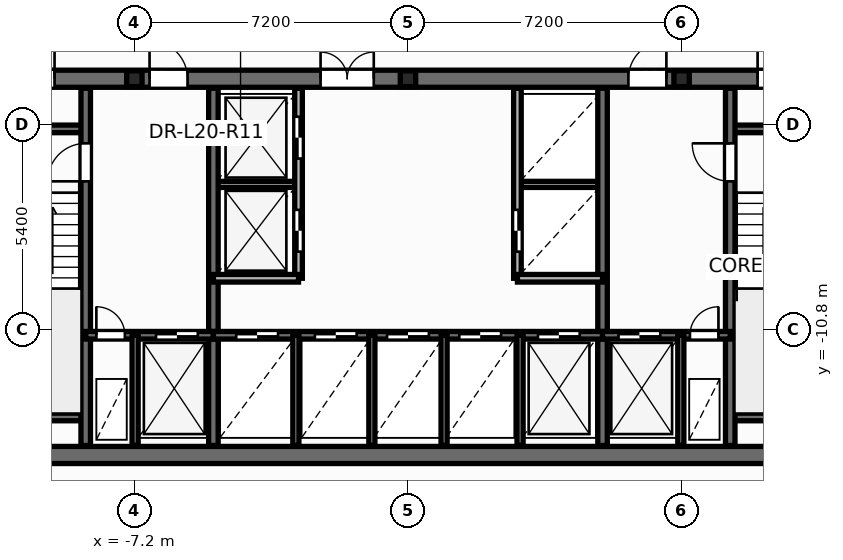
"""IFC4 building model, lengths in metres.
Left out: names, types, materials, properties, quantities, classifications, styles, units other than length and angle.
Written with IfcOpenShell. Run it as: python <this file> out.ifc"""

import sys

from ifc_helpers import new_model, si_unit, direction, frame, frame_2d, origin, origin_2d, place, context, subcontext, project, spatial, rectangle, i_section, extrude, element, fill, save


model = new_model("IFC4")
c1 = context("Model", 3, precision=1e-05, world=origin(), true_north=direction((0.0, 1.0)))
c2 = subcontext(c1, "Body", "Model", "MODEL_VIEW")
j1 = project(units=[si_unit("LENGTHUNIT", "METRE"), si_unit("PLANEANGLEUNIT", "RADIAN")], contexts=[c1])
p1 = place(None, origin())
s1 = spatial("IfcSite", under=j1, at=p1, CompositionType="ELEMENT")
p2 = place(p1, origin())
s2 = spatial("IfcBuilding", under=s1, at=p2, CompositionType="ELEMENT")
p3 = place(p2, frame((0.0, 0.0, 79.2)))
s3 = spatial("IfcBuildingStorey", under=s2, at=p3, CompositionType="ELEMENT", Elevation=79.2)
for number, where, z_axis, x_axis in (
    (1, (-7.2, -4.2, 0.0), (0.0, 0.0, 1.0), (1.0, 0.0, 0.0)),
    (2, (0.0, -4.2, 0.0), (0.0, 0.0, 1.0), (1.0, 0.0, 0.0)),
    (3, (7.2, -4.2, 0.0), (0.0, 0.0, 1.0), (1.0, 0.0, 0.0)),
):
    element("IfcColumn", number, at=place(p3, frame(where, z_axis=z_axis, x_axis=x_axis)), inside=s3, PredefinedType="PILASTER", context=c2, shape_type="SweptSolid", body=[
        extrude(i_section(OverallWidth=0.405, OverallDepth=0.414, WebThickness=0.022, FlangeThickness=0.032, at=origin_2d()), origin(), (0.0, 0.0, 1.0), 3.6),
    ])
for number, where, z_axis, x_axis in (
    (4, (-5.12, -6.98, 0.0), (0.0, 0.0, 1.0), (1.0, 0.0, 0.0)),
    (5, (2.88, -6.98, 0.0), (0.0, 0.0, 1.0), (1.0, 0.0, 0.0)),
):
    element("IfcWall", number, at=place(p3, frame(where, z_axis=z_axis, x_axis=x_axis)), inside=s3, PredefinedType="PARTITIONING", context=c2, shape_type="SweptSolid", body=[
        extrude(rectangle(XDim=2.24, YDim=0.16, at=frame_2d((1.12, 0.0))), origin(), (0.0, 0.0, 1.0), 3.35),
    ])
p4 = place(p3, frame((-12.65, -14.1, 0.0), z_axis=(0.0, 0.0, 1.0), x_axis=(1.0, 0.0, 0.0)))
e6 = element("IfcWall", 6, at=p4, inside=s3, PredefinedType="SHEAR", context=c2, shape_type="SweptSolid", body=[
    extrude(rectangle(XDim=25.3, YDim=0.45, at=frame_2d((12.65, 0.0))), origin(), (0.0, 0.0, 1.0), 3.6),
])
p5 = place(p3, frame((-12.65, -4.2, 0.0), z_axis=(0.0, 0.0, 1.0), x_axis=(1.0, 0.0, 0.0)))
e7 = element("IfcWall", 7, at=p5, inside=s3, PredefinedType="SHEAR", context=c2, shape_type="SweptSolid", body=[
    extrude(rectangle(XDim=25.3, YDim=0.45, at=frame_2d((12.65, 0.0))), origin(), (0.0, 0.0, 1.0), 3.6),
])
p6 = place(p5, frame((0.95, 0.0, 0.0)))
e8 = element("IfcOpeningElement", 8, at=p6, cuts=e7, PredefinedType="OPENING", context=c2, shape_type="SweptSolid", body=[
    extrude(rectangle(XDim=0.756, YDim=2.054, at=frame_2d((0.375, 1.027))), frame((0.0, 0.235, 0.0), z_axis=(0.0, -1.0, 0.0), x_axis=(1.0, 0.0, 0.0)), (0.0, 0.0, 1.0), 0.47),
])
p7 = place(p5, frame((2.6, 0.0, 0.0)))
e9 = element("IfcOpeningElement", 9, at=p7, cuts=e7, PredefinedType="OPENING", context=c2, shape_type="SweptSolid", body=[
    extrude(rectangle(XDim=0.756, YDim=2.054, at=frame_2d((0.375, 1.027))), frame((0.0, 0.235, 0.0), z_axis=(0.0, -1.0, 0.0), x_axis=(1.0, 0.0, 0.0)), (0.0, 0.0, 1.0), 0.47),
])
p8 = place(p5, frame((21.85, 0.0, 0.0)))
e10 = element("IfcOpeningElement", 10, at=p8, cuts=e7, PredefinedType="OPENING", context=c2, shape_type="SweptSolid", body=[
    extrude(rectangle(XDim=0.756, YDim=2.054, at=frame_2d((0.375, 1.027))), frame((0.0, 0.235, 0.0), z_axis=(0.0, -1.0, 0.0), x_axis=(1.0, 0.0, 0.0)), (0.0, 0.0, 1.0), 0.47),
])
p9 = place(p5, frame((23.5, 0.0, 0.0)))
e11 = element("IfcOpeningElement", 11, at=p9, cuts=e7, PredefinedType="OPENING", context=c2, shape_type="SweptSolid", body=[
    extrude(rectangle(XDim=0.756, YDim=2.054, at=frame_2d((0.375, 1.027))), frame((0.0, 0.235, 0.0), z_axis=(0.0, -1.0, 0.0), x_axis=(1.0, 0.0, 0.0)), (0.0, 0.0, 1.0), 0.47),
])
p10 = place(p5, frame((5.85, 0.0, 0.0)))
e12 = element("IfcOpeningElement", 12, at=p10, cuts=e7, PredefinedType="OPENING", context=c2, shape_type="SweptSolid", body=[
    extrude(rectangle(XDim=1.006, YDim=2.104, at=frame_2d((0.5, 1.052))), frame((0.0, 0.235, 0.0), z_axis=(0.0, -1.0, 0.0), x_axis=(1.0, 0.0, 0.0)), (0.0, 0.0, 1.0), 0.47),
])
p11 = place(p5, frame((10.35, 0.0, 0.0)))
e13 = element("IfcOpeningElement", 13, at=p11, cuts=e7, PredefinedType="OPENING", context=c2, shape_type="SweptSolid", body=[
    extrude(rectangle(XDim=1.406, YDim=2.154, at=frame_2d((0.7, 1.077))), frame((0.0, 0.235, 0.0), z_axis=(0.0, -1.0, 0.0), x_axis=(1.0, 0.0, 0.0)), (0.0, 0.0, 1.0), 0.47),
])
p12 = place(p5, frame((18.45, 0.0, 0.0)))
e14 = element("IfcOpeningElement", 14, at=p12, cuts=e7, PredefinedType="OPENING", context=c2, shape_type="SweptSolid", body=[
    extrude(rectangle(XDim=1.006, YDim=2.104, at=frame_2d((0.5, 1.052))), frame((0.0, 0.235, 0.0), z_axis=(0.0, -1.0, 0.0), x_axis=(1.0, 0.0, 0.0)), (0.0, 0.0, 1.0), 0.47),
])
for number, where, z_axis, x_axis in (
    (15, (-12.35, -5.52, 0.0), (0.0, 0.0, 1.0), (1.0, 0.0, 0.0)),
    (16, (-12.35, -13.1, 0.0), (0.0, 0.0, 1.0), (1.0, 0.0, 0.0)),
    (17, (8.48, -5.52, 0.0), (0.0, 0.0, 1.0), (1.0, 0.0, 0.0)),
    (18, (8.48, -13.1, 0.0), (0.0, 0.0, 1.0), (1.0, 0.0, 0.0)),
):
    element("IfcWall", number, at=place(p3, frame(where, z_axis=z_axis, x_axis=x_axis)), inside=s3, PredefinedType="SOLIDWALL", context=c2, shape_type="SweptSolid", body=[
        extrude(rectangle(XDim=3.87, YDim=0.2, at=frame_2d((1.935, 0.0))), origin(), (0.0, 0.0, 1.0), 3.6),
    ])
p13 = place(p3, frame((-8.48, -13.85, 0.0), z_axis=(0.0, 0.0, 1.0), x_axis=(0.0, 1.0, 0.0)))
e19 = element("IfcWall", 19, at=p13, inside=s3, PredefinedType="SHEAR", context=c2, shape_type="SweptSolid", body=[
    extrude(rectangle(XDim=9.4, YDim=0.25, at=frame_2d((4.7, 0.0))), origin(), (0.0, 0.0, 1.0), 3.6),
])
p14 = place(p13, frame((6.95, 0.0, 0.0)))
e20 = element("IfcOpeningElement", 20, at=p14, cuts=e19, PredefinedType="OPENING", context=c2, shape_type="SweptSolid", body=[
    extrude(rectangle(XDim=1.006, YDim=2.104, at=frame_2d((0.5, 1.052))), frame((0.0, 0.135, 0.0), z_axis=(0.0, -1.0, 0.0), x_axis=(1.0, 0.0, 0.0)), (0.0, 0.0, 1.0), 0.27),
])
p15 = place(p3, frame((8.48, -13.85, 0.0), z_axis=(0.0, 0.0, 1.0), x_axis=(0.0, 1.0, 0.0)))
e21 = element("IfcWall", 21, at=p15, inside=s3, PredefinedType="SHEAR", context=c2, shape_type="SweptSolid", body=[
    extrude(rectangle(XDim=9.4, YDim=0.25, at=frame_2d((4.7, 0.0))), origin(), (0.0, 0.0, 1.0), 3.6),
])
p16 = place(p15, frame((6.95, 0.0, 0.0)))
e22 = element("IfcOpeningElement", 22, at=p16, cuts=e21, PredefinedType="OPENING", context=c2, shape_type="SweptSolid", body=[
    extrude(rectangle(XDim=1.006, YDim=2.104, at=frame_2d((0.5, 1.052))), frame((0.0, 0.135, 0.0), z_axis=(0.0, -1.0, 0.0), x_axis=(1.0, 0.0, 0.0)), (0.0, 0.0, 1.0), 0.27),
])
for number, where, z_axis, x_axis in (
    (23, (-5.12, -13.85, 0.0), (0.0, 0.0, 1.0), (0.0, 1.0, 0.0)),
    (24, (5.12, -13.85, 0.0), (0.0, 0.0, 1.0), (0.0, 1.0, 0.0)),
):
    element("IfcWall", number, at=place(p3, frame(where, z_axis=z_axis, x_axis=x_axis)), inside=s3, PredefinedType="SHEAR", context=c2, shape_type="SweptSolid", body=[
        extrude(rectangle(XDim=9.4, YDim=0.25, at=frame_2d((4.7, 0.0))), origin(), (0.0, 0.0, 1.0), 3.6),
    ])
p17 = place(p3, frame((-8.48, -10.95, 0.0), z_axis=(0.0, 0.0, 1.0), x_axis=(1.0, 0.0, 0.0)))
e25 = element("IfcWall", 25, at=p17, inside=s3, PredefinedType="SOLIDWALL", context=c2, shape_type="SweptSolid", body=[
    extrude(rectangle(XDim=3.36, YDim=0.2, at=frame_2d((1.68, 0.0))), origin(), (0.0, 0.0, 1.0), 3.6),
])
p18 = place(p17, frame((0.28, 0.0, 0.0)))
e26 = element("IfcOpeningElement", 26, at=p18, cuts=e25, PredefinedType="OPENING", context=c2, shape_type="SweptSolid", body=[
    extrude(rectangle(XDim=0.756, YDim=2.054, at=frame_2d((0.375, 1.027))), frame((0.0, 0.11, 0.0), z_axis=(0.0, -1.0, 0.0), x_axis=(1.0, 0.0, 0.0)), (0.0, 0.0, 1.0), 0.22),
])
p19 = place(p17, frame((1.85, 0.0, 0.0)))
e27 = element("IfcOpeningElement", 27, at=p19, cuts=e25, PredefinedType="OPENING", context=c2, shape_type="SweptSolid", body=[
    extrude(rectangle(XDim=1.106, YDim=2.104, at=frame_2d((0.55, 1.052))), frame((0.0, 0.11, 0.0), z_axis=(0.0, -1.0, 0.0), x_axis=(1.0, 0.0, 0.0)), (0.0, 0.0, 1.0), 0.22),
])
p20 = place(p3, frame((-5.12, -10.95, 0.0), z_axis=(0.0, 0.0, 1.0), x_axis=(1.0, 0.0, 0.0)))
e28 = element("IfcWall", 28, at=p20, inside=s3, PredefinedType="SOLIDWALL", context=c2, shape_type="SweptSolid", body=[
    extrude(rectangle(XDim=10.24, YDim=0.2, at=frame_2d((5.12, 0.0))), origin(), (0.0, 0.0, 1.0), 3.6),
])
p21 = place(p20, frame((0.6, 0.0, 0.0)))
e29 = element("IfcOpeningElement", 29, at=p21, cuts=e28, PredefinedType="OPENING", context=c2, shape_type="SweptSolid", body=[
    extrude(rectangle(XDim=1.106, YDim=2.104, at=frame_2d((0.55, 1.052))), frame((0.0, 0.11, 0.0), z_axis=(0.0, -1.0, 0.0), x_axis=(1.0, 0.0, 0.0)), (0.0, 0.0, 1.0), 0.22),
])
p22 = place(p20, frame((2.67, 0.0, 0.0)))
e30 = element("IfcOpeningElement", 30, at=p22, cuts=e28, PredefinedType="OPENING", context=c2, shape_type="SweptSolid", body=[
    extrude(rectangle(XDim=1.106, YDim=2.104, at=frame_2d((0.55, 1.052))), frame((0.0, 0.11, 0.0), z_axis=(0.0, -1.0, 0.0), x_axis=(1.0, 0.0, 0.0)), (0.0, 0.0, 1.0), 0.22),
])
p23 = place(p20, frame((4.57, 0.0, 0.0)))
e31 = element("IfcOpeningElement", 31, at=p23, cuts=e28, PredefinedType="OPENING", context=c2, shape_type="SweptSolid", body=[
    extrude(rectangle(XDim=1.106, YDim=2.104, at=frame_2d((0.55, 1.052))), frame((0.0, 0.11, 0.0), z_axis=(0.0, -1.0, 0.0), x_axis=(1.0, 0.0, 0.0)), (0.0, 0.0, 1.0), 0.22),
])
p24 = place(p20, frame((6.47, 0.0, 0.0)))
e32 = element("IfcOpeningElement", 32, at=p24, cuts=e28, PredefinedType="OPENING", context=c2, shape_type="SweptSolid", body=[
    extrude(rectangle(XDim=1.106, YDim=2.104, at=frame_2d((0.55, 1.052))), frame((0.0, 0.11, 0.0), z_axis=(0.0, -1.0, 0.0), x_axis=(1.0, 0.0, 0.0)), (0.0, 0.0, 1.0), 0.22),
])
p25 = place(p20, frame((8.54, 0.0, 0.0)))
e33 = element("IfcOpeningElement", 33, at=p25, cuts=e28, PredefinedType="OPENING", context=c2, shape_type="SweptSolid", body=[
    extrude(rectangle(XDim=1.106, YDim=2.104, at=frame_2d((0.55, 1.052))), frame((0.0, 0.11, 0.0), z_axis=(0.0, -1.0, 0.0), x_axis=(1.0, 0.0, 0.0)), (0.0, 0.0, 1.0), 0.22),
])
p26 = place(p3, frame((5.12, -10.95, 0.0), z_axis=(0.0, 0.0, 1.0), x_axis=(1.0, 0.0, 0.0)))
e34 = element("IfcWall", 34, at=p26, inside=s3, PredefinedType="SOLIDWALL", context=c2, shape_type="SweptSolid", body=[
    extrude(rectangle(XDim=3.36, YDim=0.2, at=frame_2d((1.68, 0.0))), origin(), (0.0, 0.0, 1.0), 3.6),
])
p27 = place(p26, frame((0.42, 0.0, 0.0)))
e35 = element("IfcOpeningElement", 35, at=p27, cuts=e34, PredefinedType="OPENING", context=c2, shape_type="SweptSolid", body=[
    extrude(rectangle(XDim=1.106, YDim=2.104, at=frame_2d((0.55, 1.052))), frame((0.0, 0.11, 0.0), z_axis=(0.0, -1.0, 0.0), x_axis=(1.0, 0.0, 0.0)), (0.0, 0.0, 1.0), 0.22),
])
p28 = place(p26, frame((2.3, 0.0, 0.0)))
e36 = element("IfcOpeningElement", 36, at=p28, cuts=e34, PredefinedType="OPENING", context=c2, shape_type="SweptSolid", body=[
    extrude(rectangle(XDim=0.756, YDim=2.054, at=frame_2d((0.375, 1.027))), frame((0.0, 0.11, 0.0), z_axis=(0.0, -1.0, 0.0), x_axis=(1.0, 0.0, 0.0)), (0.0, 0.0, 1.0), 0.22),
])
for number, where, z_axis, x_axis in (
    (37, (-7.18, -13.85, 0.0), (0.0, 0.0, 1.0), (0.0, 1.0, 0.0)),
    (38, (7.18, -13.85, 0.0), (0.0, 0.0, 1.0), (0.0, 1.0, 0.0)),
    (39, (-2.95, -13.85, 0.0), (0.0, 0.0, 1.0), (0.0, 1.0, 0.0)),
    (40, (2.95, -13.85, 0.0), (0.0, 0.0, 1.0), (0.0, 1.0, 0.0)),
):
    element("IfcWall", number, at=place(p3, frame(where, z_axis=z_axis, x_axis=x_axis)), inside=s3, PredefinedType="PARTITIONING", context=c2, shape_type="SweptSolid", body=[
        extrude(rectangle(XDim=2.9, YDim=0.16, at=frame_2d((1.45, 0.0))), origin(), (0.0, 0.0, 1.0), 2.375),
    ])
p29 = place(p3, frame((-2.88, -9.45, 0.0), z_axis=(0.0, 0.0, 1.0), x_axis=(0.0, 1.0, 0.0)))
e41 = element("IfcWall", 41, at=p29, inside=s3, PredefinedType="SOLIDWALL", context=c2, shape_type="SweptSolid", body=[
    extrude(rectangle(XDim=5.0, YDim=0.2, at=frame_2d((2.5, 0.0))), origin(), (0.0, 0.0, 1.0), 3.35),
])
p30 = place(p29, frame((0.7, 0.0, 0.0)))
e42 = element("IfcOpeningElement", 42, at=p30, cuts=e41, PredefinedType="OPENING", context=c2, shape_type="SweptSolid", body=[
    extrude(rectangle(XDim=1.106, YDim=2.104, at=frame_2d((0.55, 1.052))), frame((0.0, 0.11, 0.0), z_axis=(0.0, -1.0, 0.0), x_axis=(1.0, 0.0, 0.0)), (0.0, 0.0, 1.0), 0.22),
])
p31 = place(p29, frame((3.15, 0.0, 0.0)))
e43 = element("IfcOpeningElement", 43, at=p31, cuts=e41, PredefinedType="OPENING", context=c2, shape_type="SweptSolid", body=[
    extrude(rectangle(XDim=1.106, YDim=2.104, at=frame_2d((0.55, 1.052))), frame((0.0, 0.11, 0.0), z_axis=(0.0, -1.0, 0.0), x_axis=(1.0, 0.0, 0.0)), (0.0, 0.0, 1.0), 0.22),
])
p32 = place(p3, frame((-5.12, -9.45, 0.0), z_axis=(0.0, 0.0, 1.0), x_axis=(1.0, 0.0, 0.0)))
e44 = element("IfcWall", 44, at=p32, inside=s3, PredefinedType="SOLIDWALL", context=c2, shape_type="SweptSolid", body=[
    extrude(rectangle(XDim=2.24, YDim=0.2, at=frame_2d((1.12, 0.0))), origin(), (0.0, 0.0, 1.0), 3.35),
])
p33 = place(p3, frame((2.88, -9.45, 0.0), z_axis=(0.0, 0.0, 1.0), x_axis=(0.0, 1.0, 0.0)))
e45 = element("IfcWall", 45, at=p33, inside=s3, PredefinedType="SOLIDWALL", context=c2, shape_type="SweptSolid", body=[
    extrude(rectangle(XDim=5.0, YDim=0.2, at=frame_2d((2.5, 0.0))), origin(), (0.0, 0.0, 1.0), 3.35),
])
p34 = place(p33, frame((0.7, 0.0, 0.0)))
e46 = element("IfcOpeningElement", 46, at=p34, cuts=e45, PredefinedType="OPENING", context=c2, shape_type="SweptSolid", body=[
    extrude(rectangle(XDim=1.106, YDim=2.104, at=frame_2d((0.55, 1.052))), frame((0.0, 0.11, 0.0), z_axis=(0.0, -1.0, 0.0), x_axis=(1.0, 0.0, 0.0)), (0.0, 0.0, 1.0), 0.22),
])
p35 = place(p3, frame((2.88, -9.45, 0.0), z_axis=(0.0, 0.0, 1.0), x_axis=(1.0, 0.0, 0.0)))
e47 = element("IfcWall", 47, at=p35, inside=s3, PredefinedType="SOLIDWALL", context=c2, shape_type="SweptSolid", body=[
    extrude(rectangle(XDim=2.24, YDim=0.2, at=frame_2d((1.12, 0.0))), origin(), (0.0, 0.0, 1.0), 3.35),
])
for number, where, z_axis, x_axis in (
    (48, (-0.95, -13.85, 0.0), (0.0, 0.0, 1.0), (0.0, 1.0, 0.0)),
    (49, (0.95, -13.85, 0.0), (0.0, 0.0, 1.0), (0.0, 1.0, 0.0)),
):
    element("IfcWall", number, at=place(p3, frame(where, z_axis=z_axis, x_axis=x_axis)), inside=s3, PredefinedType="PARTITIONING", context=c2, shape_type="SweptSolid", body=[
        extrude(rectangle(XDim=2.9, YDim=0.16, at=frame_2d((1.45, 0.0))), origin(), (0.0, 0.0, 1.0), 2.375),
    ])
p36 = place(p30, origin())
e50 = element("IfcDoor", 50, at=p36, inside=s3, OperationType="DOUBLE_DOOR_SLIDING", PredefinedType="DOOR", context=c2, shape_type="SweptSolid", body=[
    extrude(rectangle(XDim=1.1, YDim=2.1, at=frame_2d((0.55, 1.05))), frame((0.0, 0.025, 0.0), z_axis=(0.0, -1.0, 0.0), x_axis=(1.0, 0.0, 0.0)), (0.0, 0.0, 1.0), 0.05),
])
fill(e42, e50)
p37 = place(p31, origin())
e51 = element("IfcDoor", 51, at=p37, inside=s3, OperationType="DOUBLE_DOOR_SLIDING", PredefinedType="DOOR", context=c2, shape_type="SweptSolid", body=[
    extrude(rectangle(XDim=1.1, YDim=2.1, at=frame_2d((0.55, 1.05))), frame((0.0, 0.025, 0.0), z_axis=(0.0, -1.0, 0.0), x_axis=(1.0, 0.0, 0.0)), (0.0, 0.0, 1.0), 0.05),
])
fill(e43, e51)
p38 = place(p34, origin())
e52 = element("IfcDoor", 52, at=p38, inside=s3, OperationType="DOUBLE_DOOR_SLIDING", PredefinedType="DOOR", context=c2, shape_type="SweptSolid", body=[
    extrude(rectangle(XDim=1.1, YDim=2.1, at=frame_2d((0.55, 1.05))), frame((0.0, 0.025, 0.0), z_axis=(0.0, -1.0, 0.0), x_axis=(1.0, 0.0, 0.0)), (0.0, 0.0, 1.0), 0.05),
])
fill(e46, e52)
p39 = place(p14, origin())
e53 = element("IfcDoor", 53, at=p39, inside=s3, OperationType="SINGLE_SWING_LEFT", PredefinedType="DOOR", context=c2, shape_type="SweptSolid", body=[
    extrude(rectangle(XDim=1.0, YDim=2.1, at=frame_2d((0.5, 1.05))), frame((0.0, 0.025, 0.0), z_axis=(0.0, -1.0, 0.0), x_axis=(1.0, 0.0, 0.0)), (0.0, 0.0, 1.0), 0.05),
])
fill(e20, e53)
p40 = place(p16, origin())
e54 = element("IfcDoor", 54, at=p40, inside=s3, OperationType="SINGLE_SWING_RIGHT", PredefinedType="DOOR", context=c2, shape_type="SweptSolid", body=[
    extrude(rectangle(XDim=1.0, YDim=2.1, at=frame_2d((0.5, 1.05))), frame((0.0, 0.025, 0.0), z_axis=(0.0, -1.0, 0.0), x_axis=(1.0, 0.0, 0.0)), (0.0, 0.0, 1.0), 0.05),
])
fill(e22, e54)
p41 = place(p18, origin())
e55 = element("IfcDoor", 55, at=p41, inside=s3, OperationType="SINGLE_SWING_LEFT", PredefinedType="DOOR", context=c2, shape_type="SweptSolid", body=[
    extrude(rectangle(XDim=0.75, YDim=2.05, at=frame_2d((0.375, 1.025))), frame((0.0, 0.025, 0.0), z_axis=(0.0, -1.0, 0.0), x_axis=(1.0, 0.0, 0.0)), (0.0, 0.0, 1.0), 0.05),
])
fill(e26, e55)
p42 = place(p19, origin())
e56 = element("IfcDoor", 56, at=p42, inside=s3, OperationType="DOUBLE_DOOR_SLIDING", PredefinedType="DOOR", context=c2, shape_type="SweptSolid", body=[
    extrude(rectangle(XDim=1.1, YDim=2.1, at=frame_2d((0.55, 1.05))), frame((0.0, 0.025, 0.0), z_axis=(0.0, -1.0, 0.0), x_axis=(1.0, 0.0, 0.0)), (0.0, 0.0, 1.0), 0.05),
])
fill(e27, e56)
p43 = place(p27, origin())
e57 = element("IfcDoor", 57, at=p43, inside=s3, OperationType="DOUBLE_DOOR_SLIDING", PredefinedType="DOOR", context=c2, shape_type="SweptSolid", body=[
    extrude(rectangle(XDim=1.1, YDim=2.1, at=frame_2d((0.55, 1.05))), frame((0.0, 0.025, 0.0), z_axis=(0.0, -1.0, 0.0), x_axis=(1.0, 0.0, 0.0)), (0.0, 0.0, 1.0), 0.05),
])
fill(e35, e57)
p44 = place(p28, origin())
e58 = element("IfcDoor", 58, at=p44, inside=s3, OperationType="SINGLE_SWING_RIGHT", PredefinedType="DOOR", context=c2, shape_type="SweptSolid", body=[
    extrude(rectangle(XDim=0.75, YDim=2.05, at=frame_2d((0.375, 1.025))), frame((0.0, 0.025, 0.0), z_axis=(0.0, -1.0, 0.0), x_axis=(1.0, 0.0, 0.0)), (0.0, 0.0, 1.0), 0.05),
])
fill(e36, e58)
p45 = place(p21, origin())
e59 = element("IfcDoor", 59, at=p45, inside=s3, OperationType="DOUBLE_DOOR_SLIDING", PredefinedType="DOOR", context=c2, shape_type="SweptSolid", body=[
    extrude(rectangle(XDim=1.1, YDim=2.1, at=frame_2d((0.55, 1.05))), frame((0.0, 0.025, 0.0), z_axis=(0.0, -1.0, 0.0), x_axis=(1.0, 0.0, 0.0)), (0.0, 0.0, 1.0), 0.05),
])
fill(e29, e59)
p46 = place(p22, origin())
e60 = element("IfcDoor", 60, at=p46, inside=s3, OperationType="DOUBLE_DOOR_SLIDING", PredefinedType="DOOR", context=c2, shape_type="SweptSolid", body=[
    extrude(rectangle(XDim=1.1, YDim=2.1, at=frame_2d((0.55, 1.05))), frame((0.0, 0.025, 0.0), z_axis=(0.0, -1.0, 0.0), x_axis=(1.0, 0.0, 0.0)), (0.0, 0.0, 1.0), 0.05),
])
fill(e30, e60)
p47 = place(p23, origin())
e61 = element("IfcDoor", 61, at=p47, inside=s3, OperationType="DOUBLE_DOOR_SLIDING", PredefinedType="DOOR", context=c2, shape_type="SweptSolid", body=[
    extrude(rectangle(XDim=1.1, YDim=2.1, at=frame_2d((0.55, 1.05))), frame((0.0, 0.025, 0.0), z_axis=(0.0, -1.0, 0.0), x_axis=(1.0, 0.0, 0.0)), (0.0, 0.0, 1.0), 0.05),
])
fill(e31, e61)
p48 = place(p24, origin())
e62 = element("IfcDoor", 62, at=p48, inside=s3, OperationType="DOUBLE_DOOR_SLIDING", PredefinedType="DOOR", context=c2, shape_type="SweptSolid", body=[
    extrude(rectangle(XDim=1.1, YDim=2.1, at=frame_2d((0.55, 1.05))), frame((0.0, 0.025, 0.0), z_axis=(0.0, -1.0, 0.0), x_axis=(1.0, 0.0, 0.0)), (0.0, 0.0, 1.0), 0.05),
])
fill(e32, e62)
p49 = place(p25, origin())
e63 = element("IfcDoor", 63, at=p49, inside=s3, OperationType="DOUBLE_DOOR_SLIDING", PredefinedType="DOOR", context=c2, shape_type="SweptSolid", body=[
    extrude(rectangle(XDim=1.1, YDim=2.1, at=frame_2d((0.55, 1.05))), frame((0.0, 0.025, 0.0), z_axis=(0.0, -1.0, 0.0), x_axis=(1.0, 0.0, 0.0)), (0.0, 0.0, 1.0), 0.05),
])
fill(e33, e63)
p50 = place(p7, origin())
e64 = element("IfcDoor", 64, at=p50, inside=s3, OperationType="SINGLE_SWING_RIGHT", PredefinedType="DOOR", context=c2, shape_type="SweptSolid", body=[
    extrude(rectangle(XDim=0.75, YDim=2.05, at=frame_2d((0.375, 1.025))), frame((0.0, 0.025, 0.0), z_axis=(0.0, -1.0, 0.0), x_axis=(1.0, 0.0, 0.0)), (0.0, 0.0, 1.0), 0.05),
])
fill(e9, e64)
p51 = place(p8, origin())
e65 = element("IfcDoor", 65, at=p51, inside=s3, OperationType="SINGLE_SWING_LEFT", PredefinedType="DOOR", context=c2, shape_type="SweptSolid", body=[
    extrude(rectangle(XDim=0.75, YDim=2.05, at=frame_2d((0.375, 1.025))), frame((0.0, 0.025, 0.0), z_axis=(0.0, -1.0, 0.0), x_axis=(1.0, 0.0, 0.0)), (0.0, 0.0, 1.0), 0.05),
])
fill(e10, e65)
p52 = place(p10, origin())
e66 = element("IfcDoor", 66, at=p52, inside=s3, OperationType="SINGLE_SWING_LEFT", PredefinedType="DOOR", context=c2, shape_type="SweptSolid", body=[
    extrude(rectangle(XDim=1.0, YDim=2.1, at=frame_2d((0.5, 1.05))), frame((0.0, 0.025, 0.0), z_axis=(0.0, -1.0, 0.0), x_axis=(1.0, 0.0, 0.0)), (0.0, 0.0, 1.0), 0.05),
])
fill(e12, e66)
p53 = place(p11, origin())
e67 = element("IfcDoor", 67, at=p53, inside=s3, OperationType="DOUBLE_DOOR_SINGLE_SWING", PredefinedType="DOOR", context=c2, shape_type="SweptSolid", body=[
    extrude(rectangle(XDim=1.4, YDim=2.15, at=frame_2d((0.7, 1.075))), frame((0.0, 0.025, 0.0), z_axis=(0.0, -1.0, 0.0), x_axis=(1.0, 0.0, 0.0)), (0.0, 0.0, 1.0), 0.05),
])
fill(e13, e67)
p54 = place(p12, origin())
e68 = element("IfcDoor", 68, at=p54, inside=s3, OperationType="SINGLE_SWING_RIGHT", PredefinedType="DOOR", context=c2, shape_type="SweptSolid", body=[
    extrude(rectangle(XDim=1.0, YDim=2.1, at=frame_2d((0.5, 1.05))), frame((0.0, 0.025, 0.0), z_axis=(0.0, -1.0, 0.0), x_axis=(1.0, 0.0, 0.0)), (0.0, 0.0, 1.0), 0.05),
])
fill(e14, e68)
save(model, sys.argv[1])
